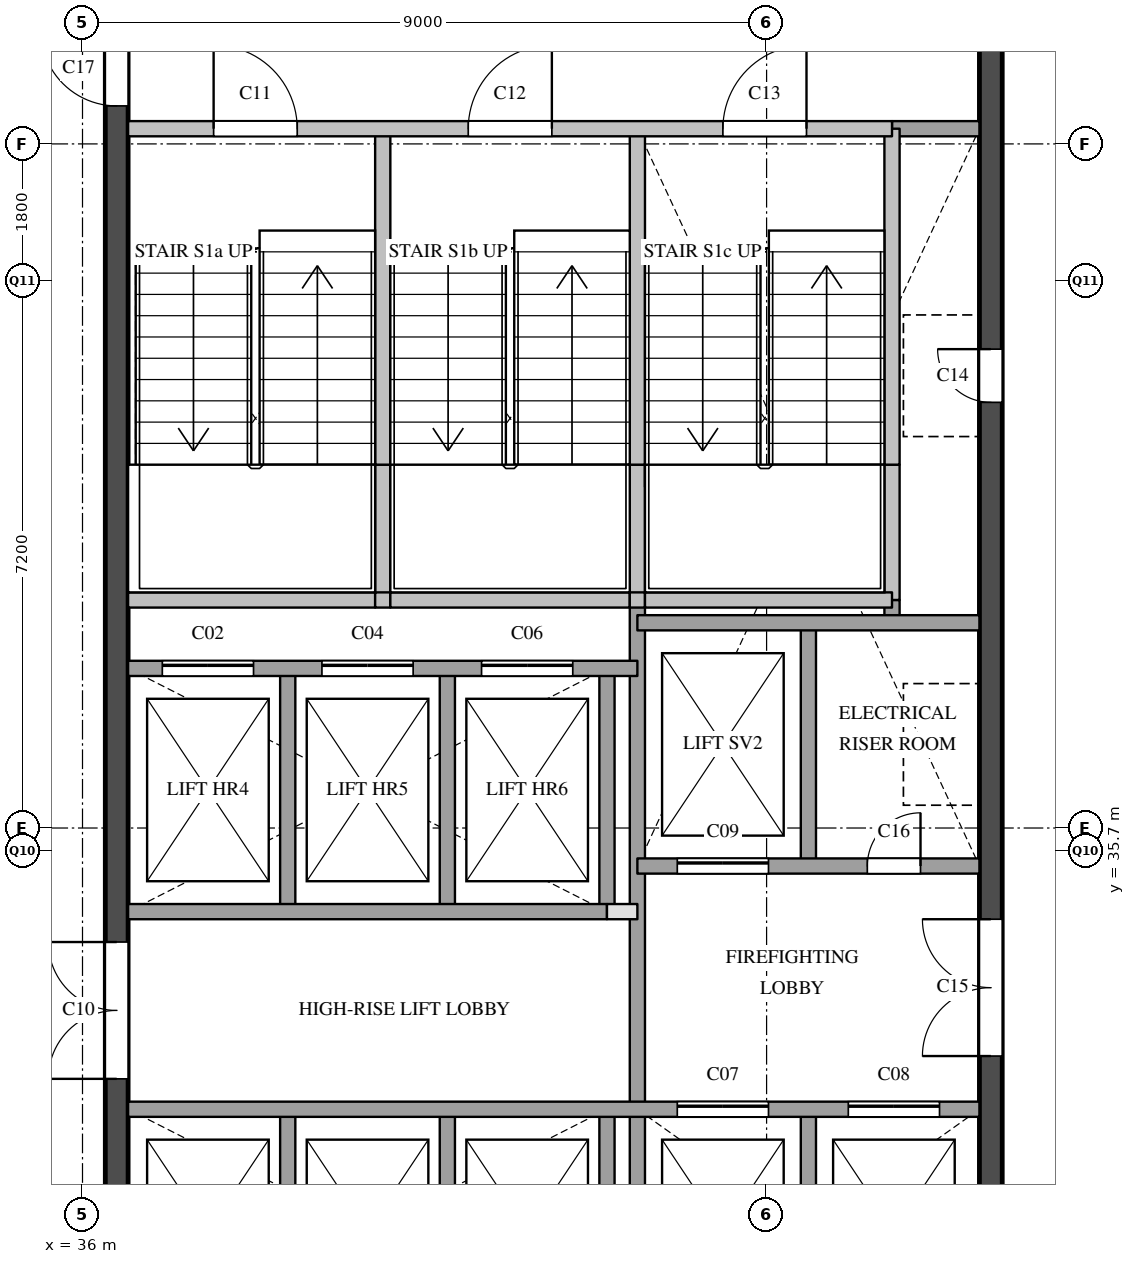
"""IFC4 building model, lengths in metres.
Left out: names, types, materials, properties, quantities, classifications, styles, units other than length and angle.
Written with IfcOpenShell. Run it as: python <this file> out.ifc"""

import sys

from ifc_helpers import new_model, si_unit, direction, frame, frame_2d, origin, place, context, subcontext, project, spatial, rectangle, extrude, element, fill, save


model = new_model("IFC4")
c1 = context("Model", 3, precision=1e-05, world=origin(), true_north=direction((0.0, 1.0)))
c2 = subcontext(c1, "Body", "Model", "MODEL_VIEW")
j1 = project(units=[si_unit("LENGTHUNIT", "METRE"), si_unit("PLANEANGLEUNIT", "RADIAN")], contexts=[c1])
p1 = place(None, origin())
s1 = spatial("IfcSite", under=j1, at=p1, CompositionType="ELEMENT")
p2 = place(p1, origin())
s2 = spatial("IfcBuilding", under=s1, at=p2, CompositionType="ELEMENT")
p3 = place(p2, frame((0.0, 0.0, 316.8)))
s3 = spatial("IfcBuildingStorey", under=s2, at=p3, CompositionType="ELEMENT", Elevation=316.8)
p4 = place(p3, frame((36.45, 29.1, 0.0), z_axis=(0.0, 0.0, 1.0), x_axis=(0.0, 1.0, 0.0)))
e1 = element("IfcWall", 1, at=p4, inside=s3, PredefinedType="SHEAR", context=c2, shape_type="SweptSolid", body=[
    extrude(rectangle(XDim=20.3, YDim=0.3, at=frame_2d((10.15, 0.0))), origin(), (0.0, 0.0, 1.0), 3.6),
])
p5 = place(p4, frame((3.6, 0.0, 0.0)))
e2 = element("IfcOpeningElement", 2, at=p5, cuts=e1, PredefinedType="OPENING", context=c2, shape_type="SweptSolid", body=[
    extrude(rectangle(XDim=1.8, YDim=2.1, at=frame_2d((0.9, 1.05))), frame((0.0, 0.16, 0.0), z_axis=(0.0, -1.0, 0.0), x_axis=(1.0, 0.0, 0.0)), (0.0, 0.0, 1.0), 0.32),
])
p6 = place(p4, frame((16.4, 0.0, 0.0)))
e3 = element("IfcOpeningElement", 3, at=p6, cuts=e1, PredefinedType="OPENING", context=c2, shape_type="SweptSolid", body=[
    extrude(rectangle(XDim=1.0, YDim=2.1, at=frame_2d((0.5, 1.05))), frame((0.0, 0.16, 0.0), z_axis=(0.0, -1.0, 0.0), x_axis=(1.0, 0.0, 0.0)), (0.0, 0.0, 1.0), 0.32),
])
p7 = place(p3, frame((47.95, 29.1, 0.0), z_axis=(0.0, 0.0, 1.0), x_axis=(0.0, 1.0, 0.0)))
e4 = element("IfcWall", 4, at=p7, inside=s3, PredefinedType="SHEAR", context=c2, shape_type="SweptSolid", body=[
    extrude(rectangle(XDim=20.3, YDim=0.3, at=frame_2d((10.15, 0.0))), origin(), (0.0, 0.0, 1.0), 3.6),
])
p8 = place(p7, frame((12.5, 0.0, 0.0)))
e5 = element("IfcOpeningElement", 5, at=p8, cuts=e4, PredefinedType="OPENING", context=c2, shape_type="SweptSolid", body=[
    extrude(rectangle(XDim=0.7, YDim=2.1, at=frame_2d((0.35, 1.05))), frame((0.0, 0.16, 0.0), z_axis=(0.0, -1.0, 0.0), x_axis=(1.0, 0.0, 0.0)), (0.0, 0.0, 1.0), 0.32),
])
p9 = place(p7, frame((3.9, 0.0, 0.0)))
e6 = element("IfcOpeningElement", 6, at=p9, cuts=e4, PredefinedType="OPENING", context=c2, shape_type="SweptSolid", body=[
    extrude(rectangle(XDim=1.8, YDim=2.1, at=frame_2d((0.9, 1.05))), frame((0.0, 0.16, 0.0), z_axis=(0.0, -1.0, 0.0), x_axis=(1.0, 0.0, 0.0)), (0.0, 0.0, 1.0), 0.32),
])
p10 = place(p3, frame((38.7, 29.1, 0.0), z_axis=(0.0, 0.0, 1.0), x_axis=(0.0, 1.0, 0.0)))
e7 = element("IfcWall", 7, at=p10, inside=s3, PredefinedType="SOLIDWALL", context=c2, shape_type="SweptSolid", body=[
    extrude(rectangle(XDim=3.2, YDim=0.2, at=frame_2d((1.6, 0.0))), origin(), (0.0, 0.0, 1.0), 3.6),
])
p11 = place(p3, frame((38.7, 34.9, 0.0), z_axis=(0.0, 0.0, 1.0), x_axis=(0.0, 1.0, 0.0)))
e8 = element("IfcWall", 8, at=p11, inside=s3, PredefinedType="SOLIDWALL", context=c2, shape_type="SweptSolid", body=[
    extrude(rectangle(XDim=3.2, YDim=0.2, at=frame_2d((1.6, 0.0))), origin(), (0.0, 0.0, 1.0), 3.6),
])
p12 = place(p3, frame((39.95, 39.0, 0.0), z_axis=(0.0, 0.0, 1.0), x_axis=(0.0, 1.0, 0.0)))
e9 = element("IfcWall", 9, at=p12, inside=s3, PredefinedType="SOLIDWALL", context=c2, shape_type="SweptSolid", body=[
    extrude(rectangle(XDim=1.78, YDim=0.2, at=frame_2d((0.89, 0.0))), origin(), (0.0, 0.0, 1.0), 3.6),
])
p13 = place(p3, frame((39.95, 40.78, 0.0), z_axis=(0.0, 0.0, 1.0), x_axis=(0.0, 1.0, 0.0)))
e10 = element("IfcWall", 10, at=p13, inside=s3, PredefinedType="SOLIDWALL", context=c2, shape_type="SweptSolid", body=[
    extrude(rectangle(XDim=4.42, YDim=0.2, at=frame_2d((2.21, 0.0))), origin(), (0.0, 0.0, 1.0), 3.6),
])
p14 = place(p3, frame((40.8, 29.1, 0.0), z_axis=(0.0, 0.0, 1.0), x_axis=(0.0, 1.0, 0.0)))
e11 = element("IfcWall", 11, at=p14, inside=s3, PredefinedType="SOLIDWALL", context=c2, shape_type="SweptSolid", body=[
    extrude(rectangle(XDim=3.2, YDim=0.2, at=frame_2d((1.6, 0.0))), origin(), (0.0, 0.0, 1.0), 3.6),
])
p15 = place(p3, frame((40.8, 34.9, 0.0), z_axis=(0.0, 0.0, 1.0), x_axis=(0.0, 1.0, 0.0)))
e12 = element("IfcWall", 12, at=p15, inside=s3, PredefinedType="SOLIDWALL", context=c2, shape_type="SweptSolid", body=[
    extrude(rectangle(XDim=3.2, YDim=0.2, at=frame_2d((1.6, 0.0))), origin(), (0.0, 0.0, 1.0), 3.6),
])
p16 = place(p3, frame((42.9, 29.1, 0.0), z_axis=(0.0, 0.0, 1.0), x_axis=(0.0, 1.0, 0.0)))
e13 = element("IfcWall", 13, at=p16, inside=s3, PredefinedType="SOLIDWALL", context=c2, shape_type="SweptSolid", body=[
    extrude(rectangle(XDim=3.2, YDim=0.2, at=frame_2d((1.6, 0.0))), origin(), (0.0, 0.0, 1.0), 3.6),
])
p17 = place(p3, frame((42.9, 34.9, 0.0), z_axis=(0.0, 0.0, 1.0), x_axis=(0.0, 1.0, 0.0)))
e14 = element("IfcWall", 14, at=p17, inside=s3, PredefinedType="SOLIDWALL", context=c2, shape_type="SweptSolid", body=[
    extrude(rectangle(XDim=3.2, YDim=0.2, at=frame_2d((1.6, 0.0))), origin(), (0.0, 0.0, 1.0), 3.6),
])
p18 = place(p3, frame((43.3, 29.1, 0.0), z_axis=(0.0, 0.0, 1.0), x_axis=(0.0, 1.0, 0.0)))
e15 = element("IfcWall", 15, at=p18, inside=s3, PredefinedType="SOLIDWALL", context=c2, shape_type="SweptSolid", body=[
    extrude(rectangle(XDim=9.9, YDim=0.2, at=frame_2d((4.95, 0.0))), origin(), (0.0, 0.0, 1.0), 3.6),
])
p19 = place(p3, frame((43.3, 39.0, 0.0), z_axis=(0.0, 0.0, 1.0), x_axis=(0.0, 1.0, 0.0)))
e16 = element("IfcWall", 16, at=p19, inside=s3, PredefinedType="SOLIDWALL", context=c2, shape_type="SweptSolid", body=[
    extrude(rectangle(XDim=1.78, YDim=0.2, at=frame_2d((0.89, 0.0))), origin(), (0.0, 0.0, 1.0), 3.6),
])
p20 = place(p3, frame((43.3, 40.78, 0.0), z_axis=(0.0, 0.0, 1.0), x_axis=(0.0, 1.0, 0.0)))
e17 = element("IfcWall", 17, at=p20, inside=s3, PredefinedType="SOLIDWALL", context=c2, shape_type="SweptSolid", body=[
    extrude(rectangle(XDim=4.42, YDim=0.2, at=frame_2d((2.21, 0.0))), origin(), (0.0, 0.0, 1.0), 3.6),
])
for number, where, z_axis, x_axis in (
    (18, (45.55, 29.1, 0.0), (0.0, 0.0, 1.0), (0.0, 1.0, 0.0)),
    (19, (45.55, 35.5, 0.0), (0.0, 0.0, 1.0), (0.0, 1.0, 0.0)),
):
    element("IfcWall", number, at=place(p3, frame(where, z_axis=z_axis, x_axis=x_axis)), inside=s3, PredefinedType="SOLIDWALL", context=c2, shape_type="SweptSolid", body=[
        extrude(rectangle(XDim=3.2, YDim=0.2, at=frame_2d((1.6, 0.0))), origin(), (0.0, 0.0, 1.0), 3.6),
    ])
p21 = place(p3, frame((46.65, 38.7, 0.0), z_axis=(0.0, 0.0, 1.0), x_axis=(0.0, 1.0, 0.0)))
e20 = element("IfcWall", 20, at=p21, inside=s3, PredefinedType="SOLIDWALL", context=c2, shape_type="SweptSolid", body=[
    extrude(rectangle(XDim=0.3, YDim=0.2, at=frame_2d((0.15, 0.0))), origin(), (0.0, 0.0, 1.0), 3.6),
])
p22 = place(p3, frame((46.65, 39.0, 0.0), z_axis=(0.0, 0.0, 1.0), x_axis=(0.0, 1.0, 0.0)))
e21 = element("IfcWall", 21, at=p22, inside=s3, PredefinedType="SOLIDWALL", context=c2, shape_type="SweptSolid", body=[
    extrude(rectangle(XDim=1.78, YDim=0.2, at=frame_2d((0.89, 0.0))), origin(), (0.0, 0.0, 1.0), 3.6),
])
p23 = place(p3, frame((46.65, 40.78, 0.0), z_axis=(0.0, 0.0, 1.0), x_axis=(0.0, 1.0, 0.0)))
e22 = element("IfcWall", 22, at=p23, inside=s3, PredefinedType="SOLIDWALL", context=c2, shape_type="SweptSolid", body=[
    extrude(rectangle(XDim=4.42, YDim=0.2, at=frame_2d((2.21, 0.0))), origin(), (0.0, 0.0, 1.0), 3.6),
])
p24 = place(p3, frame((36.6, 32.3, 0.0), z_axis=(0.0, 0.0, 1.0), x_axis=(1.0, 0.0, 0.0)))
e23 = element("IfcWall", 23, at=p24, inside=s3, PredefinedType="SOLIDWALL", context=c2, shape_type="SweptSolid", body=[
    extrude(rectangle(XDim=11.2, YDim=0.2, at=frame_2d((5.6, 0.0))), origin(), (0.0, 0.0, 1.0), 3.6),
])
p25 = place(p24, frame((7.225, 0.0, 0.0)))
e24 = element("IfcOpeningElement", 24, at=p25, cuts=e23, PredefinedType="OPENING", context=c2, shape_type="SweptSolid", body=[
    extrude(rectangle(XDim=1.2, YDim=2.1, at=frame_2d((0.6, 1.05))), frame((0.0, 0.11, 0.0), z_axis=(0.0, -1.0, 0.0), x_axis=(1.0, 0.0, 0.0)), (0.0, 0.0, 1.0), 0.22),
])
p26 = place(p24, frame((9.475, 0.0, 0.0)))
e25 = element("IfcOpeningElement", 25, at=p26, cuts=e23, PredefinedType="OPENING", context=c2, shape_type="SweptSolid", body=[
    extrude(rectangle(XDim=1.2, YDim=2.1, at=frame_2d((0.6, 1.05))), frame((0.0, 0.11, 0.0), z_axis=(0.0, -1.0, 0.0), x_axis=(1.0, 0.0, 0.0)), (0.0, 0.0, 1.0), 0.22),
])
p27 = place(p3, frame((42.9, 34.9, 0.0), z_axis=(0.0, 0.0, 1.0), x_axis=(1.0, 0.0, 0.0)))
e26 = element("IfcWall", 26, at=p27, inside=s3, PredefinedType="PARTITIONING", context=c2, shape_type="SweptSolid", body=[
    extrude(rectangle(XDim=0.4, YDim=0.2, at=frame_2d((0.2, 0.0))), origin(), (0.0, 0.0, 1.0), 3.6),
])
p28 = place(p3, frame((36.6, 34.9, 0.0), z_axis=(0.0, 0.0, 1.0), x_axis=(1.0, 0.0, 0.0)))
e27 = element("IfcWall", 27, at=p28, inside=s3, PredefinedType="SOLIDWALL", context=c2, shape_type="SweptSolid", body=[
    extrude(rectangle(XDim=6.3, YDim=0.2, at=frame_2d((3.15, 0.0))), origin(), (0.0, 0.0, 1.0), 3.6),
])
p29 = place(p3, frame((43.3, 35.5, 0.0), z_axis=(0.0, 0.0, 1.0), x_axis=(1.0, 0.0, 0.0)))
e28 = element("IfcWall", 28, at=p29, inside=s3, PredefinedType="SOLIDWALL", context=c2, shape_type="SweptSolid", body=[
    extrude(rectangle(XDim=4.5, YDim=0.2, at=frame_2d((2.25, 0.0))), origin(), (0.0, 0.0, 1.0), 3.6),
])
p30 = place(p29, frame((0.525, 0.0, 0.0)))
e29 = element("IfcOpeningElement", 29, at=p30, cuts=e28, PredefinedType="OPENING", context=c2, shape_type="SweptSolid", body=[
    extrude(rectangle(XDim=1.2, YDim=2.1, at=frame_2d((0.6, 1.05))), frame((0.0, 0.11, 0.0), z_axis=(0.0, -1.0, 0.0), x_axis=(1.0, 0.0, 0.0)), (0.0, 0.0, 1.0), 0.22),
])
p31 = place(p29, frame((3.025, 0.0, 0.0)))
e30 = element("IfcOpeningElement", 30, at=p31, cuts=e28, PredefinedType="OPENING", context=c2, shape_type="SweptSolid", body=[
    extrude(rectangle(XDim=0.7, YDim=2.1, at=frame_2d((0.35, 1.05))), frame((0.0, 0.11, 0.0), z_axis=(0.0, -1.0, 0.0), x_axis=(1.0, 0.0, 0.0)), (0.0, 0.0, 1.0), 0.22),
])
p32 = place(p3, frame((36.6, 38.1, 0.0), z_axis=(0.0, 0.0, 1.0), x_axis=(1.0, 0.0, 0.0)))
e31 = element("IfcWall", 31, at=p32, inside=s3, PredefinedType="SOLIDWALL", context=c2, shape_type="SweptSolid", body=[
    extrude(rectangle(XDim=6.7, YDim=0.2, at=frame_2d((3.35, 0.0))), origin(), (0.0, 0.0, 1.0), 3.6),
])
p33 = place(p32, frame((0.45, 0.0, 0.0)))
e32 = element("IfcOpeningElement", 32, at=p33, cuts=e31, PredefinedType="OPENING", context=c2, shape_type="SweptSolid", body=[
    extrude(rectangle(XDim=1.2, YDim=2.1, at=frame_2d((0.6, 1.05))), frame((0.0, 0.11, 0.0), z_axis=(0.0, -1.0, 0.0), x_axis=(1.0, 0.0, 0.0)), (0.0, 0.0, 1.0), 0.22),
])
p34 = place(p32, frame((2.55, 0.0, 0.0)))
e33 = element("IfcOpeningElement", 33, at=p34, cuts=e31, PredefinedType="OPENING", context=c2, shape_type="SweptSolid", body=[
    extrude(rectangle(XDim=1.2, YDim=2.1, at=frame_2d((0.6, 1.05))), frame((0.0, 0.11, 0.0), z_axis=(0.0, -1.0, 0.0), x_axis=(1.0, 0.0, 0.0)), (0.0, 0.0, 1.0), 0.22),
])
p35 = place(p32, frame((4.65, 0.0, 0.0)))
e34 = element("IfcOpeningElement", 34, at=p35, cuts=e31, PredefinedType="OPENING", context=c2, shape_type="SweptSolid", body=[
    extrude(rectangle(XDim=1.2, YDim=2.1, at=frame_2d((0.6, 1.05))), frame((0.0, 0.11, 0.0), z_axis=(0.0, -1.0, 0.0), x_axis=(1.0, 0.0, 0.0)), (0.0, 0.0, 1.0), 0.22),
])
p36 = place(p3, frame((43.3, 38.7, 0.0), z_axis=(0.0, 0.0, 1.0), x_axis=(1.0, 0.0, 0.0)))
e35 = element("IfcWall", 35, at=p36, inside=s3, PredefinedType="SOLIDWALL", context=c2, shape_type="SweptSolid", body=[
    extrude(rectangle(XDim=4.5, YDim=0.2, at=frame_2d((2.25, 0.0))), origin(), (0.0, 0.0, 1.0), 3.6),
])
p37 = place(p3, frame((36.6, 39.0, 0.0), z_axis=(0.0, 0.0, 1.0), x_axis=(1.0, 0.0, 0.0)))
e36 = element("IfcWall", 36, at=p37, inside=s3, PredefinedType="SOLIDWALL", context=c2, shape_type="SweptSolid", body=[
    extrude(rectangle(XDim=3.25, YDim=0.2, at=frame_2d((1.625, 0.0))), origin(), (0.0, 0.0, 1.0), 3.6),
])
p38 = place(p3, frame((39.85, 39.0, 0.0), z_axis=(0.0, 0.0, 1.0), x_axis=(1.0, 0.0, 0.0)))
e37 = element("IfcWall", 37, at=p38, inside=s3, PredefinedType="SOLIDWALL", context=c2, shape_type="SweptSolid", body=[
    extrude(rectangle(XDim=0.2, YDim=0.2, at=frame_2d((0.1, 0.0))), origin(), (0.0, 0.0, 1.0), 3.6),
])
p39 = place(p3, frame((40.05, 39.0, 0.0), z_axis=(0.0, 0.0, 1.0), x_axis=(1.0, 0.0, 0.0)))
e38 = element("IfcWall", 38, at=p39, inside=s3, PredefinedType="SOLIDWALL", context=c2, shape_type="SweptSolid", body=[
    extrude(rectangle(XDim=3.15, YDim=0.2, at=frame_2d((1.575, 0.0))), origin(), (0.0, 0.0, 1.0), 3.6),
])
p40 = place(p3, frame((43.2, 39.0, 0.0), z_axis=(0.0, 0.0, 1.0), x_axis=(1.0, 0.0, 0.0)))
e39 = element("IfcWall", 39, at=p40, inside=s3, PredefinedType="SOLIDWALL", context=c2, shape_type="SweptSolid", body=[
    extrude(rectangle(XDim=0.2, YDim=0.2, at=frame_2d((0.1, 0.0))), origin(), (0.0, 0.0, 1.0), 3.6),
])
p41 = place(p3, frame((43.4, 39.0, 0.0), z_axis=(0.0, 0.0, 1.0), x_axis=(1.0, 0.0, 0.0)))
e40 = element("IfcWall", 40, at=p41, inside=s3, PredefinedType="SOLIDWALL", context=c2, shape_type="SweptSolid", body=[
    extrude(rectangle(XDim=3.25, YDim=0.2, at=frame_2d((1.625, 0.0))), origin(), (0.0, 0.0, 1.0), 3.6),
])
p42 = place(p3, frame((46.65, 45.2, 0.0), z_axis=(0.0, 0.0, 1.0), x_axis=(1.0, 0.0, 0.0)))
e41 = element("IfcWall", 41, at=p42, inside=s3, PredefinedType="SOLIDWALL", context=c2, shape_type="SweptSolid", body=[
    extrude(rectangle(XDim=1.15, YDim=0.2, at=frame_2d((0.575, 0.0))), origin(), (0.0, 0.0, 1.0), 3.6),
])
p43 = place(p3, frame((36.6, 45.2, 0.0), z_axis=(0.0, 0.0, 1.0), x_axis=(1.0, 0.0, 0.0)))
e42 = element("IfcWall", 42, at=p43, inside=s3, PredefinedType="SOLIDWALL", context=c2, shape_type="SweptSolid", body=[
    extrude(rectangle(XDim=10.05, YDim=0.2, at=frame_2d((5.025, 0.0))), origin(), (0.0, 0.0, 1.0), 3.6),
])
p44 = place(p43, frame((1.125, 0.0, 0.0)))
e43 = element("IfcOpeningElement", 43, at=p44, cuts=e42, PredefinedType="OPENING", context=c2, shape_type="SweptSolid", body=[
    extrude(rectangle(XDim=1.1, YDim=2.1, at=frame_2d((0.55, 1.05))), frame((0.0, 0.11, 0.0), z_axis=(0.0, -1.0, 0.0), x_axis=(1.0, 0.0, 0.0)), (0.0, 0.0, 1.0), 0.22),
])
p45 = place(p43, frame((4.475, 0.0, 0.0)))
e44 = element("IfcOpeningElement", 44, at=p45, cuts=e42, PredefinedType="OPENING", context=c2, shape_type="SweptSolid", body=[
    extrude(rectangle(XDim=1.1, YDim=2.1, at=frame_2d((0.55, 1.05))), frame((0.0, 0.11, 0.0), z_axis=(0.0, -1.0, 0.0), x_axis=(1.0, 0.0, 0.0)), (0.0, 0.0, 1.0), 0.22),
])
p46 = place(p43, frame((7.825, 0.0, 0.0)))
e45 = element("IfcOpeningElement", 45, at=p46, cuts=e42, PredefinedType="OPENING", context=c2, shape_type="SweptSolid", body=[
    extrude(rectangle(XDim=1.1, YDim=2.1, at=frame_2d((0.55, 1.05))), frame((0.0, 0.11, 0.0), z_axis=(0.0, -1.0, 0.0), x_axis=(1.0, 0.0, 0.0)), (0.0, 0.0, 1.0), 0.22),
])
p47 = place(p33, origin())
e46 = element("IfcDoor", 46, at=p47, inside=s3, OperationType="SLIDING_TO_LEFT", PredefinedType="DOOR", context=c2, shape_type="SweptSolid", body=[
    extrude(rectangle(XDim=1.2, YDim=2.1, at=frame_2d((0.6, 1.05))), frame((0.0, 0.025, 0.0), z_axis=(0.0, -1.0, 0.0), x_axis=(1.0, 0.0, 0.0)), (0.0, 0.0, 1.0), 0.05),
])
fill(e32, e46)
p48 = place(p34, origin())
e47 = element("IfcDoor", 47, at=p48, inside=s3, OperationType="SLIDING_TO_LEFT", PredefinedType="DOOR", context=c2, shape_type="SweptSolid", body=[
    extrude(rectangle(XDim=1.2, YDim=2.1, at=frame_2d((0.6, 1.05))), frame((0.0, 0.025, 0.0), z_axis=(0.0, -1.0, 0.0), x_axis=(1.0, 0.0, 0.0)), (0.0, 0.0, 1.0), 0.05),
])
fill(e33, e47)
p49 = place(p35, origin())
e48 = element("IfcDoor", 48, at=p49, inside=s3, OperationType="SLIDING_TO_LEFT", PredefinedType="DOOR", context=c2, shape_type="SweptSolid", body=[
    extrude(rectangle(XDim=1.2, YDim=2.1, at=frame_2d((0.6, 1.05))), frame((0.0, 0.025, 0.0), z_axis=(0.0, -1.0, 0.0), x_axis=(1.0, 0.0, 0.0)), (0.0, 0.0, 1.0), 0.05),
])
fill(e34, e48)
p50 = place(p25, origin())
e49 = element("IfcDoor", 49, at=p50, inside=s3, OperationType="SLIDING_TO_LEFT", PredefinedType="DOOR", context=c2, shape_type="SweptSolid", body=[
    extrude(rectangle(XDim=1.2, YDim=2.1, at=frame_2d((0.6, 1.05))), frame((0.0, 0.025, 0.0), z_axis=(0.0, -1.0, 0.0), x_axis=(1.0, 0.0, 0.0)), (0.0, 0.0, 1.0), 0.05),
])
fill(e24, e49)
p51 = place(p26, origin())
e50 = element("IfcDoor", 50, at=p51, inside=s3, OperationType="SLIDING_TO_LEFT", PredefinedType="DOOR", context=c2, shape_type="SweptSolid", body=[
    extrude(rectangle(XDim=1.2, YDim=2.1, at=frame_2d((0.6, 1.05))), frame((0.0, 0.025, 0.0), z_axis=(0.0, -1.0, 0.0), x_axis=(1.0, 0.0, 0.0)), (0.0, 0.0, 1.0), 0.05),
])
fill(e25, e50)
p52 = place(p30, origin())
e51 = element("IfcDoor", 51, at=p52, inside=s3, OperationType="SLIDING_TO_LEFT", PredefinedType="DOOR", context=c2, shape_type="SweptSolid", body=[
    extrude(rectangle(XDim=1.2, YDim=2.1, at=frame_2d((0.6, 1.05))), frame((0.0, 0.025, 0.0), z_axis=(0.0, -1.0, 0.0), x_axis=(1.0, 0.0, 0.0)), (0.0, 0.0, 1.0), 0.05),
])
fill(e29, e51)
p53 = place(p5, origin())
e52 = element("IfcDoor", 52, at=p53, inside=s3, OperationType="DOUBLE_DOOR_SINGLE_SWING", PredefinedType="DOOR", context=c2, shape_type="SweptSolid", body=[
    extrude(rectangle(XDim=1.8, YDim=2.1, at=frame_2d((0.9, 1.05))), frame((0.0, 0.025, 0.0), z_axis=(0.0, -1.0, 0.0), x_axis=(1.0, 0.0, 0.0)), (0.0, 0.0, 1.0), 0.05),
])
fill(e2, e52)
p54 = place(p44, origin())
e53 = element("IfcDoor", 53, at=p54, inside=s3, OperationType="SINGLE_SWING_LEFT", PredefinedType="DOOR", context=c2, shape_type="SweptSolid", body=[
    extrude(rectangle(XDim=1.1, YDim=2.1, at=frame_2d((0.55, 1.05))), frame((0.0, 0.025, 0.0), z_axis=(0.0, -1.0, 0.0), x_axis=(1.0, 0.0, 0.0)), (0.0, 0.0, 1.0), 0.05),
])
fill(e43, e53)
p55 = place(p45, origin())
e54 = element("IfcDoor", 54, at=p55, inside=s3, OperationType="SINGLE_SWING_RIGHT", PredefinedType="DOOR", context=c2, shape_type="SweptSolid", body=[
    extrude(rectangle(XDim=1.1, YDim=2.1, at=frame_2d((0.55, 1.05))), frame((0.0, 0.025, 0.0), z_axis=(0.0, -1.0, 0.0), x_axis=(1.0, 0.0, 0.0)), (0.0, 0.0, 1.0), 0.05),
])
fill(e44, e54)
p56 = place(p46, origin())
e55 = element("IfcDoor", 55, at=p56, inside=s3, OperationType="SINGLE_SWING_RIGHT", PredefinedType="DOOR", context=c2, shape_type="SweptSolid", body=[
    extrude(rectangle(XDim=1.1, YDim=2.1, at=frame_2d((0.55, 1.05))), frame((0.0, 0.025, 0.0), z_axis=(0.0, -1.0, 0.0), x_axis=(1.0, 0.0, 0.0)), (0.0, 0.0, 1.0), 0.05),
])
fill(e45, e55)
p57 = place(p8, origin())
e56 = element("IfcDoor", 56, at=p57, inside=s3, OperationType="SINGLE_SWING_RIGHT", PredefinedType="DOOR", context=c2, shape_type="SweptSolid", body=[
    extrude(rectangle(XDim=0.7, YDim=2.1, at=frame_2d((0.35, 1.05))), frame((0.0, 0.025, 0.0), z_axis=(0.0, -1.0, 0.0), x_axis=(1.0, 0.0, 0.0)), (0.0, 0.0, 1.0), 0.05),
])
fill(e5, e56)
p58 = place(p9, origin())
e57 = element("IfcDoor", 57, at=p58, inside=s3, OperationType="DOUBLE_DOOR_SINGLE_SWING", PredefinedType="DOOR", context=c2, shape_type="SweptSolid", body=[
    extrude(rectangle(XDim=1.8, YDim=2.1, at=frame_2d((0.9, 1.05))), frame((0.0, 0.025, 0.0), z_axis=(0.0, -1.0, 0.0), x_axis=(1.0, 0.0, 0.0)), (0.0, 0.0, 1.0), 0.05),
])
fill(e6, e57)
p59 = place(p31, origin())
e58 = element("IfcDoor", 58, at=p59, inside=s3, OperationType="SINGLE_SWING_RIGHT", PredefinedType="DOOR", context=c2, shape_type="SweptSolid", body=[
    extrude(rectangle(XDim=0.7, YDim=2.1, at=frame_2d((0.35, 1.05))), frame((0.0, 0.025, 0.0), z_axis=(0.0, -1.0, 0.0), x_axis=(1.0, 0.0, 0.0)), (0.0, 0.0, 1.0), 0.05),
])
fill(e30, e58)
p60 = place(p6, origin())
e59 = element("IfcDoor", 59, at=p60, inside=s3, OperationType="SINGLE_SWING_RIGHT", PredefinedType="DOOR", context=c2, shape_type="SweptSolid", body=[
    extrude(rectangle(XDim=1.0, YDim=2.1, at=frame_2d((0.5, 1.05))), frame((0.0, 0.025, 0.0), z_axis=(0.0, -1.0, 0.0), x_axis=(1.0, 0.0, 0.0)), (0.0, 0.0, 1.0), 0.05),
])
fill(e3, e59)
save(model, sys.argv[1])
